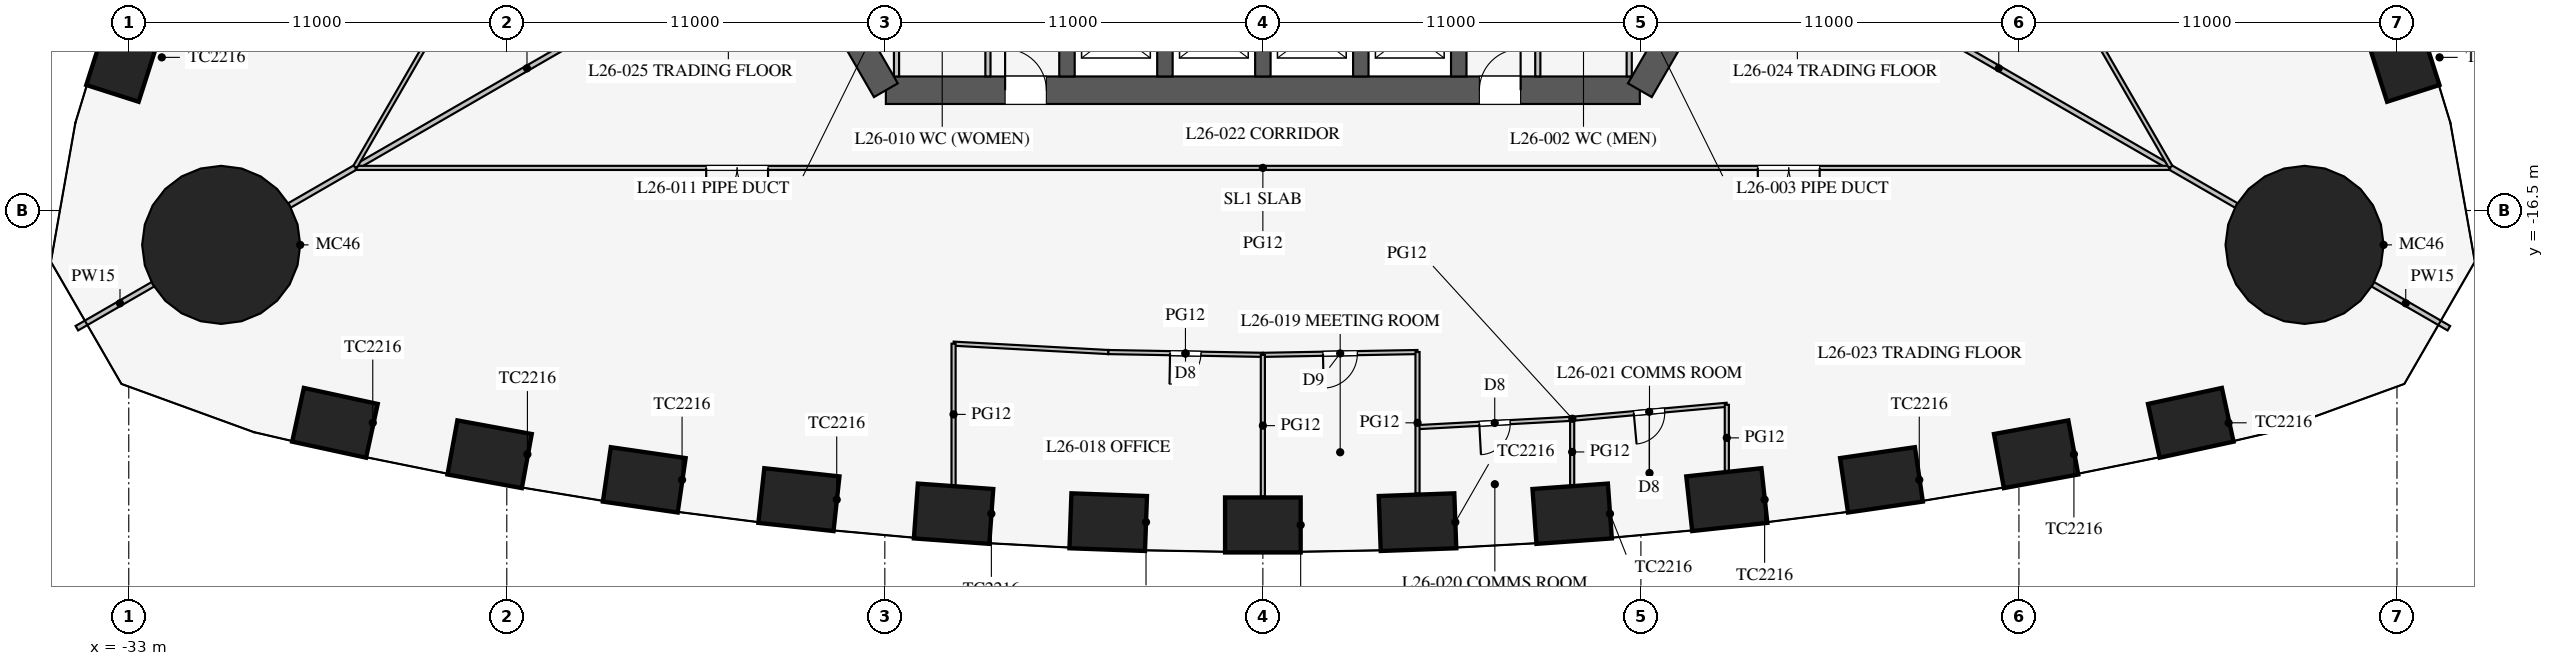
"""IFC4 building model, lengths in metres.
Left out: names, types, materials, properties, quantities, classifications, styles, units other than length and angle.
Written with IfcOpenShell. Run it as: python <this file> out.ifc"""

import sys

from ifc_helpers import new_model, si_unit, direction, frame, frame_2d, origin, origin_2d, place, context, subcontext, project, spatial, rectangle, circle, extrude, element, fill, save


model = new_model("IFC4")
c1 = context("Model", 3, precision=1e-05, world=origin(), true_north=direction((0.0, 1.0)))
c2 = subcontext(c1, "Body", "Model", "MODEL_VIEW")
j1 = project(units=[si_unit("LENGTHUNIT", "METRE"), si_unit("PLANEANGLEUNIT", "RADIAN")], contexts=[c1])
p1 = place(None, origin())
s1 = spatial("IfcSite", under=j1, at=p1, CompositionType="ELEMENT")
p2 = place(p1, origin())
s2 = spatial("IfcBuilding", under=s1, at=p2, CompositionType="ELEMENT")
p3 = place(p2, frame((0.0, 0.0, 115.7)))
s3 = spatial("IfcBuildingStorey", under=s2, at=p3, CompositionType="ELEMENT", Elevation=115.7)
for number, where, z_axis, x_axis in (
    (1, (-27.0, -22.677, 0.0), (0.0, 0.0, 1.0), (0.977, -0.212, 0.0)),
    (2, (-22.5, -23.593, 0.0), (0.0, 0.0, 1.0), (0.984, -0.18, 0.0)),
    (3, (-18.0, -24.337, 0.0), (0.0, 0.0, 1.0), (0.99, -0.144, 0.0)),
    (4, (-13.5, -24.913, 0.0), (0.0, 0.0, 1.0), (0.994, -0.108, 0.0)),
    (5, (-9.0, -25.323, 0.0), (0.0, 0.0, 1.0), (0.997, -0.072, 0.0)),
    (6, (-4.5, -25.568, 0.0), (0.0, 0.0, 1.0), (0.999, -0.036, 0.0)),
    (7, (0.0, -25.65, 0.0), (0.0, 0.0, 1.0), (1.0, 0.0, 0.0)),
    (8, (4.5, -25.568, 0.0), (0.0, 0.0, 1.0), (0.999, 0.036, 0.0)),
    (9, (9.0, -25.323, 0.0), (0.0, 0.0, 1.0), (0.997, 0.072, 0.0)),
    (10, (13.5, -24.913, 0.0), (0.0, 0.0, 1.0), (0.994, 0.108, 0.0)),
    (11, (18.0, -24.337, 0.0), (0.0, 0.0, 1.0), (0.99, 0.144, 0.0)),
    (12, (22.5, -23.593, 0.0), (0.0, 0.0, 1.0), (0.984, 0.18, 0.0)),
    (13, (27.0, -22.677, 0.0), (0.0, 0.0, 1.0), (0.977, 0.212, 0.0)),
    (14, (33.139, -12.044, 0.0), (0.0, 0.0, 1.0), (-0.305, 0.952, 0.0)),
    (15, (-33.139, -12.044, 0.0), (0.0, 0.0, 1.0), (-0.305, -0.952, 0.0)),
):
    element("IfcColumn", number, at=place(p3, frame(where, z_axis=z_axis, x_axis=x_axis)), inside=s3, PredefinedType="COLUMN", context=c2, shape_type="SweptSolid", body=[
        extrude(rectangle(XDim=2.2, YDim=1.6, at=origin_2d()), origin(), (0.0, 0.0, 1.0), 4.2),
    ])
for number, where, z_axis, x_axis in (
    (16, (30.311, -17.5, 0.0), (0.0, 0.0, 1.0), (1.0, 0.0, 0.0)),
    (17, (-30.311, -17.5, 0.0), (0.0, 0.0, 1.0), (1.0, 0.0, 0.0)),
):
    element("IfcColumn", number, at=place(p3, frame(where, z_axis=z_axis, x_axis=x_axis)), inside=s3, PredefinedType="COLUMN", context=c2, shape_type="SweptSolid", body=[
        extrude(circle(Radius=2.3, at=origin_2d()), origin(), (0.0, 0.0, 1.0), 4.2),
    ])
p4 = place(p3, frame((-10.97, -13.0, 0.0), z_axis=(0.0, 0.0, 1.0), x_axis=(1.0, 0.0, 0.0)))
e18 = element("IfcWall", 18, at=p4, inside=s3, PredefinedType="SHEAR", context=c2, shape_type="SweptSolid", body=[
    extrude(rectangle(XDim=21.939, YDim=0.8, at=frame_2d((10.97, 0.0))), origin(), (0.0, 0.0, 1.0), 4.2),
])
p5 = place(p4, frame((17.27, 0.0, 0.0)))
e19 = element("IfcOpeningElement", 19, at=p5, cuts=e18, PredefinedType="OPENING", context=c2, shape_type="SweptSolid", body=[
    extrude(rectangle(XDim=1.2, YDim=2.1, at=frame_2d((0.6, 1.05))), frame((0.0, 0.41, 0.0), z_axis=(0.0, -1.0, 0.0), x_axis=(1.0, 0.0, 0.0)), (0.0, 0.0, 1.0), 0.82),
])
p6 = place(p4, frame((3.47, 0.0, 0.0)))
e20 = element("IfcOpeningElement", 20, at=p6, cuts=e18, PredefinedType="OPENING", context=c2, shape_type="SweptSolid", body=[
    extrude(rectangle(XDim=1.2, YDim=2.1, at=frame_2d((0.6, 1.05))), frame((0.0, 0.41, 0.0), z_axis=(0.0, -1.0, 0.0), x_axis=(1.0, 0.0, 0.0)), (0.0, 0.0, 1.0), 0.82),
])
for number, where, z_axis, x_axis in (
    (21, (10.97, -13.0, 0.0), (0.0, 0.0, 1.0), (0.5, 0.866, 0.0)),
    (22, (-16.743, -3.0, 0.0), (0.0, 0.0, 1.0), (0.5, -0.866, 0.0)),
):
    element("IfcWall", number, at=place(p3, frame(where, z_axis=z_axis, x_axis=x_axis)), inside=s3, PredefinedType="SHEAR", context=c2, shape_type="SweptSolid", body=[
        extrude(rectangle(XDim=11.547, YDim=0.8, at=frame_2d((5.773, 0.0))), origin(), (0.0, 0.0, 1.0), 4.2),
    ])
for number, where, z_axis, x_axis in (
    (23, (-5.7, -10.025, 0.0), (0.0, 0.0, 1.0), (0.0, -1.0, 0.0)),
    (24, (-2.85, -10.025, 0.0), (0.0, 0.0, 1.0), (0.0, -1.0, 0.0)),
    (25, (0.0, -10.025, 0.0), (0.0, 0.0, 1.0), (0.0, -1.0, 0.0)),
    (26, (2.85, -10.025, 0.0), (0.0, 0.0, 1.0), (0.0, -1.0, 0.0)),
    (27, (5.7, -10.025, 0.0), (0.0, 0.0, 1.0), (0.0, -1.0, 0.0)),
):
    element("IfcWall", number, at=place(p3, frame(where, z_axis=z_axis, x_axis=x_axis)), inside=s3, PredefinedType="SHEAR", context=c2, shape_type="SweptSolid", body=[
        extrude(rectangle(XDim=2.575, YDim=0.45, at=frame_2d((1.288, 0.0))), origin(), (0.0, 0.0, 1.0), 4.2),
    ])
p7 = place(p3, frame((8.0, -7.5, 0.0), z_axis=(0.0, 0.0, 1.0), x_axis=(0.0, -1.0, 0.0)))
e28 = element("IfcWall", 28, at=p7, inside=s3, PredefinedType="PARTITIONING", context=c2, shape_type="SweptSolid", body=[
    extrude(rectangle(XDim=5.1, YDim=0.15, at=frame_2d((2.55, 0.0))), origin(), (0.0, 0.0, 1.0), 4.0),
])
p8 = place(p7, frame((1.3, 0.0, 0.0)))
e29 = element("IfcOpeningElement", 29, at=p8, cuts=e28, PredefinedType="OPENING", context=c2, shape_type="SweptSolid", body=[
    extrude(rectangle(XDim=0.9, YDim=2.1, at=frame_2d((0.45, 1.05))), frame((0.0, 0.085, 0.0), z_axis=(0.0, -1.0, 0.0), x_axis=(1.0, 0.0, 0.0)), (0.0, 0.0, 1.0), 0.17),
])
p9 = place(p3, frame((-8.0, -7.5, 0.0), z_axis=(0.0, 0.0, 1.0), x_axis=(0.0, -1.0, 0.0)))
e30 = element("IfcWall", 30, at=p9, inside=s3, PredefinedType="PARTITIONING", context=c2, shape_type="SweptSolid", body=[
    extrude(rectangle(XDim=5.1, YDim=0.15, at=frame_2d((2.55, 0.0))), origin(), (0.0, 0.0, 1.0), 4.0),
])
p10 = place(p9, frame((2.6, 0.0, 0.0)))
e31 = element("IfcOpeningElement", 31, at=p10, cuts=e30, PredefinedType="OPENING", context=c2, shape_type="SweptSolid", body=[
    extrude(rectangle(XDim=0.9, YDim=2.1, at=frame_2d((0.45, 1.05))), frame((0.0, 0.085, 0.0), z_axis=(0.0, -1.0, 0.0), x_axis=(1.0, 0.0, 0.0)), (0.0, 0.0, 1.0), 0.17),
])
for number, where, z_axis, x_axis in (
    (32, (10.66, -8.5, 0.0), (0.0, 0.0, 1.0), (0.0, -1.0, 0.0)),
    (33, (-10.66, -8.5, 0.0), (0.0, 0.0, 1.0), (0.0, -1.0, 0.0)),
):
    element("IfcWall", number, at=place(p3, frame(where, z_axis=z_axis, x_axis=x_axis)), inside=s3, PredefinedType="PARTITIONING", context=c2, shape_type="SweptSolid", body=[
        extrude(rectangle(XDim=4.1, YDim=0.15, at=frame_2d((2.05, 0.0))), origin(), (0.0, 0.0, 1.0), 4.0),
    ])
p11 = place(p3, frame((14.203, -8.2, 0.0), z_axis=(0.0, 0.0, 1.0), x_axis=(0.866024668836, -0.500001272966, 0.0)))
e34 = element("IfcWall", 34, at=p11, inside=s3, PredefinedType="PARTITIONING", context=c2, shape_type="SweptSolid", body=[
    extrude(rectangle(XDim=16.65, YDim=0.15, at=frame_2d((8.325, 0.0))), origin(), (0.0, 0.0, 1.0), 2.3),
])
p12 = place(p3, frame((32.0, -18.475, 0.0), z_axis=(0.0, 0.0, 1.0), x_axis=(0.866042548026, -0.499970304126, 0.0)))
e35 = element("IfcWall", 35, at=p12, inside=s3, PredefinedType="PARTITIONING", context=c2, shape_type="SweptSolid", body=[
    extrude(rectangle(XDim=2.899, YDim=0.15, at=frame_2d((1.45, 0.0))), origin(), (0.0, 0.0, 1.0), 2.3),
])
p13 = place(p3, frame((-14.203, -8.2, 0.0), z_axis=(0.0, 0.0, 1.0), x_axis=(-0.866024668836, -0.500001272966, 0.0)))
e36 = element("IfcWall", 36, at=p13, inside=s3, PredefinedType="PARTITIONING", context=c2, shape_type="SweptSolid", body=[
    extrude(rectangle(XDim=16.65, YDim=0.15, at=frame_2d((8.325, 0.0))), origin(), (0.0, 0.0, 1.0), 2.3),
])
p14 = place(p3, frame((-32.0, -18.475, 0.0), z_axis=(0.0, 0.0, 1.0), x_axis=(-0.866042548026, -0.499970304126, 0.0)))
e37 = element("IfcWall", 37, at=p14, inside=s3, PredefinedType="PARTITIONING", context=c2, shape_type="SweptSolid", body=[
    extrude(rectangle(XDim=2.899, YDim=0.15, at=frame_2d((1.45, 0.0))), origin(), (0.0, 0.0, 1.0), 2.3),
])
p15 = place(p3, frame((-26.398, -15.26, 0.0), z_axis=(0.0, 0.0, 1.0), x_axis=(1.0, 0.0, 0.0)))
e38 = element("IfcWall", 38, at=p15, inside=s3, PredefinedType="PARTITIONING", context=c2, shape_type="SweptSolid", body=[
    extrude(rectangle(XDim=52.796, YDim=0.12, at=frame_2d((26.398, 0.0))), origin(), (0.0, 0.0, 1.0), 2.9),
])
p16 = place(p15, frame((10.2, 0.0, 0.15)))
e39 = element("IfcOpeningElement", 39, at=p16, cuts=e38, PredefinedType="OPENING", context=c2, shape_type="SweptSolid", body=[
    extrude(rectangle(XDim=1.8, YDim=2.1, at=frame_2d((0.9, 1.05))), frame((0.0, 0.07, 0.0), z_axis=(0.0, -1.0, 0.0), x_axis=(1.0, 0.0, 0.0)), (0.0, 0.0, 1.0), 0.14),
])
p17 = place(p15, frame((40.8, 0.0, 0.15)))
e40 = element("IfcOpeningElement", 40, at=p17, cuts=e38, PredefinedType="OPENING", context=c2, shape_type="SweptSolid", body=[
    extrude(rectangle(XDim=1.8, YDim=2.1, at=frame_2d((0.9, 1.05))), frame((0.0, 0.07, 0.0), z_axis=(0.0, -1.0, 0.0), x_axis=(1.0, 0.0, 0.0)), (0.0, 0.0, 1.0), 0.14),
])
p18 = place(p3, frame((0.0, -20.7, 0.0), z_axis=(0.0, 0.0, 1.0), x_axis=(0.999837820638, 0.018009231578, 0.0)))
e41 = element("IfcWall", 41, at=p18, inside=s3, PredefinedType="PARTITIONING", context=c2, shape_type="SweptSolid", body=[
    extrude(rectangle(XDim=4.501, YDim=0.12, at=frame_2d((2.25, 0.0))), origin(), (0.0, 0.0, 1.0), 2.9),
])
p19 = place(p18, frame((1.75, 0.0, 0.15)))
e42 = element("IfcOpeningElement", 42, at=p19, cuts=e41, PredefinedType="OPENING", context=c2, shape_type="SweptSolid", body=[
    extrude(rectangle(XDim=1.0, YDim=2.1, at=frame_2d((0.5, 1.05))), frame((0.0, 0.07, 0.0), z_axis=(0.0, -1.0, 0.0), x_axis=(1.0, 0.0, 0.0)), (0.0, 0.0, 1.0), 0.14),
])
p20 = place(p3, frame((4.5, -22.803, 0.0), z_axis=(0.0, 0.0, 1.0), x_axis=(0.998537376538, 0.054065771581, 0.0)))
e43 = element("IfcWall", 43, at=p20, inside=s3, PredefinedType="PARTITIONING", context=c2, shape_type="SweptSolid", body=[
    extrude(rectangle(XDim=4.507, YDim=0.12, at=frame_2d((2.253, 0.0))), origin(), (0.0, 0.0, 1.0), 2.9),
])
p21 = place(p20, frame((1.8, 0.0, 0.15)))
e44 = element("IfcOpeningElement", 44, at=p21, cuts=e43, PredefinedType="OPENING", context=c2, shape_type="SweptSolid", body=[
    extrude(rectangle(XDim=0.9, YDim=2.1, at=frame_2d((0.45, 1.05))), frame((0.0, 0.07, 0.0), z_axis=(0.0, -1.0, 0.0), x_axis=(1.0, 0.0, 0.0)), (0.0, 0.0, 1.0), 0.14),
])
p22 = place(p3, frame((9.0, -22.56, 0.0), z_axis=(0.0, 0.0, 1.0), x_axis=(0.995935173755, 0.090072913121, 0.0)))
e45 = element("IfcWall", 45, at=p22, inside=s3, PredefinedType="PARTITIONING", context=c2, shape_type="SweptSolid", body=[
    extrude(rectangle(XDim=4.518, YDim=0.12, at=frame_2d((2.259, 0.0))), origin(), (0.0, 0.0, 1.0), 2.9),
])
p23 = place(p22, frame((1.8, 0.0, 0.15)))
e46 = element("IfcOpeningElement", 46, at=p23, cuts=e45, PredefinedType="OPENING", context=c2, shape_type="SweptSolid", body=[
    extrude(rectangle(XDim=0.9, YDim=2.1, at=frame_2d((0.45, 1.05))), frame((0.0, 0.07, 0.0), z_axis=(0.0, -1.0, 0.0), x_axis=(1.0, 0.0, 0.0)), (0.0, 0.0, 1.0), 0.14),
])
p24 = place(p3, frame((-4.5, -20.619, 0.0), z_axis=(0.0, 0.0, 1.0), x_axis=(0.999837820638, -0.018009231578, 0.0)))
e47 = element("IfcWall", 47, at=p24, inside=s3, PredefinedType="PARTITIONING", context=c2, shape_type="SweptSolid", body=[
    extrude(rectangle(XDim=4.501, YDim=0.12, at=frame_2d((2.25, 0.0))), origin(), (0.0, 0.0, 1.0), 2.9),
])
p25 = place(p24, frame((1.8, 0.0, 0.15)))
e48 = element("IfcOpeningElement", 48, at=p25, cuts=e47, PredefinedType="OPENING", context=c2, shape_type="SweptSolid", body=[
    extrude(rectangle(XDim=0.9, YDim=2.1, at=frame_2d((0.45, 1.05))), frame((0.0, 0.07, 0.0), z_axis=(0.0, -1.0, 0.0), x_axis=(1.0, 0.0, 0.0)), (0.0, 0.0, 1.0), 0.14),
])
p26 = place(p3, frame((-9.0, -20.375, 0.0), z_axis=(0.0, 0.0, 1.0), x_axis=(0.998537376538, -0.054065771581, 0.0)))
e49 = element("IfcWall", 49, at=p26, inside=s3, PredefinedType="PARTITIONING", context=c2, shape_type="SweptSolid", body=[
    extrude(rectangle(XDim=4.507, YDim=0.12, at=frame_2d((2.253, 0.0))), origin(), (0.0, 0.0, 1.0), 2.9),
])
p27 = place(p3, frame((0.0, -20.7, 0.0), z_axis=(0.0, 0.0, 1.0), x_axis=(0.0, -1.0, 0.0)))
e50 = element("IfcWall", 50, at=p27, inside=s3, PredefinedType="PARTITIONING", context=c2, shape_type="SweptSolid", body=[
    extrude(rectangle(XDim=4.12, YDim=0.12, at=frame_2d((2.06, 0.0))), origin(), (0.0, 0.0, 1.0), 2.9),
])
p28 = place(p3, frame((13.5, -22.153, 0.0), z_axis=(0.0, 0.0, 1.0), x_axis=(0.0, -1.0, 0.0)))
e51 = element("IfcWall", 51, at=p28, inside=s3, PredefinedType="PARTITIONING", context=c2, shape_type="SweptSolid", body=[
    extrude(rectangle(XDim=1.925, YDim=0.12, at=frame_2d((0.963, 0.0))), origin(), (0.0, 0.0, 1.0), 2.9),
])
p29 = place(p3, frame((4.5, -20.619, 0.0), z_axis=(0.0, 0.0, 1.0), x_axis=(0.0, -1.0, 0.0)))
e52 = element("IfcWall", 52, at=p29, inside=s3, PredefinedType="PARTITIONING", context=c2, shape_type="SweptSolid", body=[
    extrude(rectangle(XDim=4.119, YDim=0.12, at=frame_2d((2.06, 0.0))), origin(), (0.0, 0.0, 1.0), 2.9),
])
p30 = place(p3, frame((9.0, -22.56, 0.0), z_axis=(0.0, 0.0, 1.0), x_axis=(0.0, -1.0, 0.0)))
e53 = element("IfcWall", 53, at=p30, inside=s3, PredefinedType="PARTITIONING", context=c2, shape_type="SweptSolid", body=[
    extrude(rectangle(XDim=1.931, YDim=0.12, at=frame_2d((0.965, 0.0))), origin(), (0.0, 0.0, 1.0), 2.9),
])
p31 = place(p3, frame((-9.0, -20.375, 0.0), z_axis=(0.0, 0.0, 1.0), x_axis=(0.0, -1.0, 0.0)))
e54 = element("IfcWall", 54, at=p31, inside=s3, PredefinedType="PARTITIONING", context=c2, shape_type="SweptSolid", body=[
    extrude(rectangle(XDim=4.116, YDim=0.12, at=frame_2d((2.058, 0.0))), origin(), (0.0, 0.0, 1.0), 2.9),
])
p32 = place(p3, frame((26.415, -15.231, 0.0), z_axis=(0.0, 0.0, 1.0), x_axis=(-0.50000091641, 0.866024874695, 0.0)))
e55 = element("IfcWall", 55, at=p32, inside=s3, PredefinedType="PARTITIONING", context=c2, shape_type="SweptSolid", body=[
    extrude(rectangle(XDim=52.796, YDim=0.12, at=frame_2d((26.398, 0.0))), origin(), (0.0, 0.0, 1.0), 2.9),
])
p33 = place(p32, frame((10.2, 0.0, 0.15)))
e56 = element("IfcOpeningElement", 56, at=p33, cuts=e55, PredefinedType="OPENING", context=c2, shape_type="SweptSolid", body=[
    extrude(rectangle(XDim=1.8, YDim=2.1, at=frame_2d((0.9, 1.05))), frame((0.0, 0.07, 0.0), z_axis=(0.0, -1.0, 0.0), x_axis=(1.0, 0.0, 0.0)), (0.0, 0.0, 1.0), 0.14),
])
p34 = place(p32, frame((40.8, 0.0, 0.15)))
e57 = element("IfcOpeningElement", 57, at=p34, cuts=e55, PredefinedType="OPENING", context=c2, shape_type="SweptSolid", body=[
    extrude(rectangle(XDim=1.8, YDim=2.1, at=frame_2d((0.9, 1.05))), frame((0.0, 0.07, 0.0), z_axis=(0.0, -1.0, 0.0), x_axis=(1.0, 0.0, 0.0)), (0.0, 0.0, 1.0), 0.14),
])
p35 = place(p3, frame((-0.016, 30.491, 0.0), z_axis=(0.0, 0.0, 1.0), x_axis=(-0.50000091641, -0.866024874695, 0.0)))
e58 = element("IfcWall", 58, at=p35, inside=s3, PredefinedType="PARTITIONING", context=c2, shape_type="SweptSolid", body=[
    extrude(rectangle(XDim=52.796, YDim=0.12, at=frame_2d((26.398, 0.0))), origin(), (0.0, 0.0, 1.0), 2.9),
])
p36 = place(p35, frame((10.2, 0.0, 0.15)))
e59 = element("IfcOpeningElement", 59, at=p36, cuts=e58, PredefinedType="OPENING", context=c2, shape_type="SweptSolid", body=[
    extrude(rectangle(XDim=1.8, YDim=2.1, at=frame_2d((0.9, 1.05))), frame((0.0, 0.07, 0.0), z_axis=(0.0, -1.0, 0.0), x_axis=(1.0, 0.0, 0.0)), (0.0, 0.0, 1.0), 0.14),
])
p37 = place(p35, frame((40.8, 0.0, 0.15)))
e60 = element("IfcOpeningElement", 60, at=p37, cuts=e58, PredefinedType="OPENING", context=c2, shape_type="SweptSolid", body=[
    extrude(rectangle(XDim=1.8, YDim=2.1, at=frame_2d((0.9, 1.05))), frame((0.0, 0.07, 0.0), z_axis=(0.0, -1.0, 0.0), x_axis=(1.0, 0.0, 0.0)), (0.0, 0.0, 1.0), 0.14),
])
p38 = place(p5, origin())
e61 = element("IfcDoor", 61, at=p38, inside=s3, OperationType="SINGLE_SWING_RIGHT", PredefinedType="DOOR", context=c2, shape_type="SweptSolid", body=[
    extrude(rectangle(XDim=1.2, YDim=2.1, at=frame_2d((0.6, 1.05))), frame((0.0, 0.025, 0.0), z_axis=(0.0, -1.0, 0.0), x_axis=(1.0, 0.0, 0.0)), (0.0, 0.0, 1.0), 0.05),
])
fill(e19, e61)
p39 = place(p6, origin())
e62 = element("IfcDoor", 62, at=p39, inside=s3, OperationType="SINGLE_SWING_LEFT", PredefinedType="DOOR", context=c2, shape_type="SweptSolid", body=[
    extrude(rectangle(XDim=1.2, YDim=2.1, at=frame_2d((0.6, 1.05))), frame((0.0, 0.025, 0.0), z_axis=(0.0, -1.0, 0.0), x_axis=(1.0, 0.0, 0.0)), (0.0, 0.0, 1.0), 0.05),
])
fill(e20, e62)
p40 = place(p25, frame((0.9, 0.0, 0.0), z_axis=(0.0, 0.0, 1.0), x_axis=(-1.0, 0.0, 0.0)))
e63 = element("IfcDoor", 63, at=p40, inside=s3, OperationType="SINGLE_SWING_RIGHT", PredefinedType="DOOR", context=c2, shape_type="SweptSolid", body=[
    extrude(rectangle(XDim=0.9, YDim=2.1, at=frame_2d((0.45, 1.05))), frame((0.0, 0.025, 0.0), z_axis=(0.0, -1.0, 0.0), x_axis=(1.0, 0.0, 0.0)), (0.0, 0.0, 1.0), 0.05),
])
fill(e48, e63)
p41 = place(p19, frame((1.0, 0.0, 0.0), z_axis=(0.0, 0.0, 1.0), x_axis=(-1.0, 0.0, 0.0)))
e64 = element("IfcDoor", 64, at=p41, inside=s3, OperationType="SINGLE_SWING_RIGHT", PredefinedType="DOOR", context=c2, shape_type="SweptSolid", body=[
    extrude(rectangle(XDim=1.0, YDim=2.1, at=frame_2d((0.5, 1.05))), frame((0.0, 0.025, 0.0), z_axis=(0.0, -1.0, 0.0), x_axis=(1.0, 0.0, 0.0)), (0.0, 0.0, 1.0), 0.05),
])
fill(e42, e64)
p42 = place(p21, frame((0.9, 0.0, 0.0), z_axis=(0.0, 0.0, 1.0), x_axis=(-1.0, 0.0, 0.0)))
e65 = element("IfcDoor", 65, at=p42, inside=s3, OperationType="SINGLE_SWING_RIGHT", PredefinedType="DOOR", context=c2, shape_type="SweptSolid", body=[
    extrude(rectangle(XDim=0.9, YDim=2.1, at=frame_2d((0.45, 1.05))), frame((0.0, 0.025, 0.0), z_axis=(0.0, -1.0, 0.0), x_axis=(1.0, 0.0, 0.0)), (0.0, 0.0, 1.0), 0.05),
])
fill(e44, e65)
p43 = place(p23, frame((0.9, 0.0, 0.0), z_axis=(0.0, 0.0, 1.0), x_axis=(-1.0, 0.0, 0.0)))
e66 = element("IfcDoor", 66, at=p43, inside=s3, OperationType="SINGLE_SWING_RIGHT", PredefinedType="DOOR", context=c2, shape_type="SweptSolid", body=[
    extrude(rectangle(XDim=0.9, YDim=2.1, at=frame_2d((0.45, 1.05))), frame((0.0, 0.025, 0.0), z_axis=(0.0, -1.0, 0.0), x_axis=(1.0, 0.0, 0.0)), (0.0, 0.0, 1.0), 0.05),
])
fill(e46, e66)
p44 = place(p16, frame((1.8, 0.0, 0.0), z_axis=(0.0, 0.0, 1.0), x_axis=(-1.0, 0.0, 0.0)))
e67 = element("IfcDoor", 67, at=p44, inside=s3, OperationType="DOUBLE_DOOR_SINGLE_SWING", PredefinedType="DOOR", context=c2, shape_type="SweptSolid", body=[
    extrude(rectangle(XDim=1.8, YDim=2.1, at=frame_2d((0.9, 1.05))), frame((0.0, 0.025, 0.0), z_axis=(0.0, -1.0, 0.0), x_axis=(1.0, 0.0, 0.0)), (0.0, 0.0, 1.0), 0.05),
])
fill(e39, e67)
p45 = place(p17, frame((1.8, 0.0, 0.0), z_axis=(0.0, 0.0, 1.0), x_axis=(-1.0, 0.0, 0.0)))
e68 = element("IfcDoor", 68, at=p45, inside=s3, OperationType="DOUBLE_DOOR_SINGLE_SWING", PredefinedType="DOOR", context=c2, shape_type="SweptSolid", body=[
    extrude(rectangle(XDim=1.8, YDim=2.1, at=frame_2d((0.9, 1.05))), frame((0.0, 0.025, 0.0), z_axis=(0.0, -1.0, 0.0), x_axis=(1.0, 0.0, 0.0)), (0.0, 0.0, 1.0), 0.05),
])
fill(e40, e68)
save(model, sys.argv[1])
